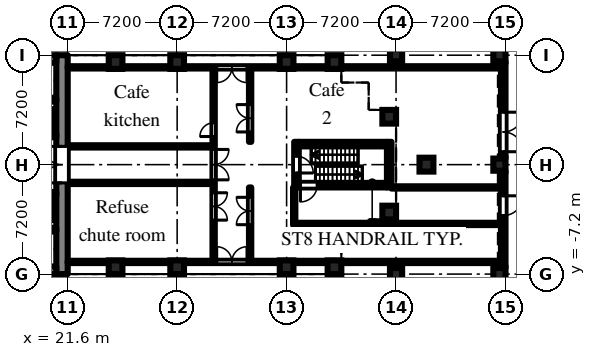
"""IFC4 building model, lengths in metres.
Left out: names, types, materials, properties, quantities, classifications, styles, units other than length and angle.
Written with IfcOpenShell. Run it as: python <this file> out.ifc"""

import sys

from ifc_helpers import new_model, si_unit, direction, frame, frame_2d, origin, origin_2d, place, context, subcontext, project, spatial, rectangle, hollow_circle, extrude, element, fill, save


model = new_model("IFC4")
c1 = context("Model", 3, precision=1e-05, world=origin(), true_north=direction((0.0, 1.0)))
c2 = subcontext(c1, "Body", "Model", "MODEL_VIEW")
j1 = project(units=[si_unit("LENGTHUNIT", "METRE"), si_unit("PLANEANGLEUNIT", "RADIAN")], contexts=[c1])
p1 = place(None, origin())
s1 = spatial("IfcSite", under=j1, at=p1, CompositionType="ELEMENT")
p2 = place(p1, origin())
s2 = spatial("IfcBuilding", under=s1, at=p2, CompositionType="ELEMENT")
p3 = place(p2, origin())
s3 = spatial("IfcBuildingStorey", under=s2, at=p3, CompositionType="ELEMENT", Elevation=0.0)
for number, where, z_axis, x_axis in (
    (1, (24.75, -6.75, 0.0), (0.0, 0.0, 1.0), (1.0, 0.0, 0.0)),
    (2, (24.75, 6.75, 0.0), (0.0, 0.0, 1.0), (1.0, 0.0, 0.0)),
    (3, (28.8, -6.75, 0.0), (0.0, 0.0, 1.0), (1.0, 0.0, 0.0)),
    (4, (28.8, 6.75, 0.0), (0.0, 0.0, 1.0), (1.0, 0.0, 0.0)),
    (5, (36.0, -6.75, 0.0), (0.0, 0.0, 1.0), (1.0, 0.0, 0.0)),
    (6, (36.0, 6.75, 0.0), (0.0, 0.0, 1.0), (1.0, 0.0, 0.0)),
    (7, (39.15, -6.75, 0.0), (0.0, 0.0, 1.0), (1.0, 0.0, 0.0)),
    (8, (39.15, 6.75, 0.0), (0.0, 0.0, 1.0), (1.0, 0.0, 0.0)),
    (9, (42.75, -3.15, 0.0), (0.0, 0.0, 1.0), (1.0, 0.0, 0.0)),
    (10, (42.75, 3.15, 0.0), (0.0, 0.0, 1.0), (1.0, 0.0, 0.0)),
):
    element("IfcColumn", number, at=place(p3, frame(where, z_axis=z_axis, x_axis=x_axis)), inside=s3, PredefinedType="COLUMN", context=c2, shape_type="SweptSolid", body=[
        extrude(rectangle(XDim=0.9, YDim=0.9, at=origin_2d()), origin(), (0.0, 0.0, 1.0), 7.2),
    ])
for number, where, z_axis, x_axis in (
    (11, (43.2, -7.2, 0.0), (0.0, 0.0, 1.0), (1.0, 0.0, 0.0)),
    (12, (43.2, 7.2, 0.0), (0.0, 0.0, 1.0), (1.0, 0.0, 0.0)),
    (13, (50.0, -7.2, 0.0), (0.0, 0.0, 1.0), (1.0, 0.0, 0.0)),
    (14, (50.0, 0.0, 0.0), (0.0, 0.0, 1.0), (1.0, 0.0, 0.0)),
    (15, (50.0, 7.2, 0.0), (0.0, 0.0, 1.0), (1.0, 0.0, 0.0)),
):
    element("IfcColumn", number, at=place(p3, frame(where, z_axis=z_axis, x_axis=x_axis)), inside=s3, PredefinedType="COLUMN", context=c2, shape_type="SweptSolid", body=[
        extrude(rectangle(XDim=0.8, YDim=0.8, at=origin_2d()), origin(), (0.0, 0.0, 1.0), 6.6),
    ])
p4 = place(p3, frame((45.2, 0.0, 0.0), z_axis=(0.0, 0.0, 1.0), x_axis=(1.0, 0.0, 0.0)))
e16 = element("IfcColumn", 16, at=p4, inside=s3, PredefinedType="COLUMN", context=c2, shape_type="SweptSolid", body=[
    extrude(hollow_circle(Radius=0.457, WallThickness=0.05, at=origin_2d()), origin(), (0.0, 0.0, 1.0), 7.5),
])
p5 = place(p3, frame((50.25, -6.8, 0.0), z_axis=(0.0, 0.0, 1.0), x_axis=(0.0, 1.0, 0.0)))
e17 = element("IfcWall", 17, at=p5, inside=s3, PredefinedType="SOLIDWALL", context=c2, shape_type="SweptSolid", body=[
    extrude(rectangle(XDim=6.4, YDim=0.3, at=frame_2d((3.2, 0.0))), origin(), (0.0, 0.0, 1.0), 6.6),
])
p6 = place(p5, frame((3.45, 0.0, 0.0)))
e18 = element("IfcOpeningElement", 18, at=p6, cuts=e17, PredefinedType="OPENING", context=c2, shape_type="SweptSolid", body=[
    extrude(rectangle(XDim=1.3, YDim=2.1, at=frame_2d((0.65, 1.05))), frame((0.0, 0.16, 0.0), z_axis=(0.0, -1.0, 0.0), x_axis=(1.0, 0.0, 0.0)), (0.0, 0.0, 1.0), 0.32),
])
p7 = place(p3, frame((50.25, 0.4, 0.0), z_axis=(0.0, 0.0, 1.0), x_axis=(0.0, 1.0, 0.0)))
e19 = element("IfcWall", 19, at=p7, inside=s3, PredefinedType="SOLIDWALL", context=c2, shape_type="SweptSolid", body=[
    extrude(rectangle(XDim=6.4, YDim=0.3, at=frame_2d((3.2, 0.0))), origin(), (0.0, 0.0, 1.0), 6.6),
])
p8 = place(p7, frame((0.45, 0.0, 0.0)))
e20 = element("IfcOpeningElement", 20, at=p8, cuts=e19, PredefinedType="OPENING", context=c2, shape_type="SweptSolid", body=[
    extrude(rectangle(XDim=2.6, YDim=2.4, at=frame_2d((1.3, 1.2))), frame((0.0, 0.16, 0.0), z_axis=(0.0, -1.0, 0.0), x_axis=(1.0, 0.0, 0.0)), (0.0, 0.0, 1.0), 0.32),
])
p9 = place(p3, frame((21.225, -7.2, 0.0), z_axis=(0.0, 0.0, 1.0), x_axis=(0.0, 1.0, 0.0)))
e21 = element("IfcWall", 21, at=p9, inside=s3, PredefinedType="SHEAR", context=c2, shape_type="SweptSolid", body=[
    extrude(rectangle(XDim=14.4, YDim=0.75, at=frame_2d((7.2, 0.0))), origin(), (0.0, 0.0, 1.0), 6.6),
])
p10 = place(p9, frame((6.0, 0.0, 0.0)))
e22 = element("IfcOpeningElement", 22, at=p10, cuts=e21, PredefinedType="OPENING", context=c2, shape_type="SweptSolid", body=[
    extrude(rectangle(XDim=2.4, YDim=2.2, at=frame_2d((1.2, 1.1))), frame((0.0, 0.385, 0.0), z_axis=(0.0, -1.0, 0.0), x_axis=(1.0, 0.0, 0.0)), (0.0, 0.0, 1.0), 0.77),
])
p11 = place(p3, frame((7.9, 6.95, 0.0), z_axis=(0.0, 0.0, 1.0), x_axis=(1.0, 0.0, 0.0)))
e23 = element("IfcWall", 23, at=p11, inside=s3, PredefinedType="SHEAR", context=c2, shape_type="SweptSolid", body=[
    extrude(rectangle(XDim=12.95, YDim=0.5, at=frame_2d((6.475, 0.0))), origin(), (0.0, 0.0, 1.0), 6.6),
])
p12 = place(p11, frame((5.35, 0.0, 0.0)))
e24 = element("IfcOpeningElement", 24, at=p12, cuts=e23, PredefinedType="OPENING", context=c2, shape_type="SweptSolid", body=[
    extrude(rectangle(XDim=1.1, YDim=2.1, at=frame_2d((0.55, 1.05))), frame((0.0, 0.26, 0.0), z_axis=(0.0, -1.0, 0.0), x_axis=(1.0, 0.0, 0.0)), (0.0, 0.0, 1.0), 0.52),
])
p13 = place(p3, frame((7.9, 1.925, 0.0), z_axis=(0.0, 0.0, 1.0), x_axis=(1.0, 0.0, 0.0)))
e25 = element("IfcWall", 25, at=p13, inside=s3, PredefinedType="SHEAR", context=c2, shape_type="SweptSolid", body=[
    extrude(rectangle(XDim=12.95, YDim=0.25, at=frame_2d((6.475, 0.0))), origin(), (0.0, 0.0, 1.0), 6.6),
])
p14 = place(p13, frame((11.425, 0.0, 0.0)))
e26 = element("IfcOpeningElement", 26, at=p14, cuts=e25, PredefinedType="OPENING", context=c2, shape_type="SweptSolid", body=[
    extrude(rectangle(XDim=1.1, YDim=2.1, at=frame_2d((0.55, 1.05))), frame((0.0, 0.135, 0.0), z_axis=(0.0, -1.0, 0.0), x_axis=(1.0, 0.0, 0.0)), (0.0, 0.0, 1.0), 0.27),
])
p15 = place(p13, frame((0.525, 0.0, 0.0)))
e27 = element("IfcOpeningElement", 27, at=p15, cuts=e25, PredefinedType="OPENING", context=c2, shape_type="SweptSolid", body=[
    extrude(rectangle(XDim=0.9, YDim=2.1, at=frame_2d((0.45, 1.05))), frame((0.0, 0.135, 0.0), z_axis=(0.0, -1.0, 0.0), x_axis=(1.0, 0.0, 0.0)), (0.0, 0.0, 1.0), 0.27),
])
p16 = place(p13, frame((2.625, 0.0, 0.0)))
e28 = element("IfcOpeningElement", 28, at=p16, cuts=e25, PredefinedType="OPENING", context=c2, shape_type="SweptSolid", body=[
    extrude(rectangle(XDim=1.1, YDim=2.1, at=frame_2d((0.55, 1.05))), frame((0.0, 0.135, 0.0), z_axis=(0.0, -1.0, 0.0), x_axis=(1.0, 0.0, 0.0)), (0.0, 0.0, 1.0), 0.27),
])
p17 = place(p13, frame((7.125, 0.0, 0.0)))
e29 = element("IfcOpeningElement", 29, at=p17, cuts=e25, PredefinedType="OPENING", context=c2, shape_type="SweptSolid", body=[
    extrude(rectangle(XDim=0.9, YDim=2.1, at=frame_2d((0.45, 1.05))), frame((0.0, 0.135, 0.0), z_axis=(0.0, -1.0, 0.0), x_axis=(1.0, 0.0, 0.0)), (0.0, 0.0, 1.0), 0.27),
])
p18 = place(p3, frame((12.3, 4.275, 0.0), z_axis=(0.0, 0.0, 1.0), x_axis=(1.0, 0.0, 0.0)))
e30 = element("IfcWall", 30, at=p18, inside=s3, PredefinedType="SHEAR", context=c2, shape_type="SweptSolid", body=[
    extrude(rectangle(XDim=8.55, YDim=0.25, at=frame_2d((4.275, 0.0))), origin(), (0.0, 0.0, 1.0), 6.6),
])
p19 = place(p3, frame((7.9, -6.95, 0.0), z_axis=(0.0, 0.0, 1.0), x_axis=(1.0, 0.0, 0.0)))
e31 = element("IfcWall", 31, at=p19, inside=s3, PredefinedType="SHEAR", context=c2, shape_type="SweptSolid", body=[
    extrude(rectangle(XDim=12.95, YDim=0.5, at=frame_2d((6.475, 0.0))), origin(), (0.0, 0.0, 1.0), 6.6),
])
p20 = place(p19, frame((5.35, 0.0, 0.0)))
e32 = element("IfcOpeningElement", 32, at=p20, cuts=e31, PredefinedType="OPENING", context=c2, shape_type="SweptSolid", body=[
    extrude(rectangle(XDim=1.1, YDim=2.1, at=frame_2d((0.55, 1.05))), frame((0.0, 0.26, 0.0), z_axis=(0.0, -1.0, 0.0), x_axis=(1.0, 0.0, 0.0)), (0.0, 0.0, 1.0), 0.52),
])
p21 = place(p3, frame((7.9, -1.925, 0.0), z_axis=(0.0, 0.0, 1.0), x_axis=(1.0, 0.0, 0.0)))
e33 = element("IfcWall", 33, at=p21, inside=s3, PredefinedType="SHEAR", context=c2, shape_type="SweptSolid", body=[
    extrude(rectangle(XDim=12.95, YDim=0.25, at=frame_2d((6.475, 0.0))), origin(), (0.0, 0.0, 1.0), 6.6),
])
p22 = place(p21, frame((4.825, 0.0, 0.0)))
e34 = element("IfcOpeningElement", 34, at=p22, cuts=e33, PredefinedType="OPENING", context=c2, shape_type="SweptSolid", body=[
    extrude(rectangle(XDim=1.1, YDim=2.1, at=frame_2d((0.55, 1.05))), frame((0.0, 0.135, 0.0), z_axis=(0.0, -1.0, 0.0), x_axis=(1.0, 0.0, 0.0)), (0.0, 0.0, 1.0), 0.27),
])
p23 = place(p21, frame((7.025, 0.0, 0.0)))
e35 = element("IfcOpeningElement", 35, at=p23, cuts=e33, PredefinedType="OPENING", context=c2, shape_type="SweptSolid", body=[
    extrude(rectangle(XDim=1.1, YDim=2.1, at=frame_2d((0.55, 1.05))), frame((0.0, 0.135, 0.0), z_axis=(0.0, -1.0, 0.0), x_axis=(1.0, 0.0, 0.0)), (0.0, 0.0, 1.0), 0.27),
])
p24 = place(p21, frame((9.225, 0.0, 0.0)))
e36 = element("IfcOpeningElement", 36, at=p24, cuts=e33, PredefinedType="OPENING", context=c2, shape_type="SweptSolid", body=[
    extrude(rectangle(XDim=1.1, YDim=2.1, at=frame_2d((0.55, 1.05))), frame((0.0, 0.135, 0.0), z_axis=(0.0, -1.0, 0.0), x_axis=(1.0, 0.0, 0.0)), (0.0, 0.0, 1.0), 0.27),
])
p25 = place(p21, frame((11.425, 0.0, 0.0)))
e37 = element("IfcOpeningElement", 37, at=p25, cuts=e33, PredefinedType="OPENING", context=c2, shape_type="SweptSolid", body=[
    extrude(rectangle(XDim=1.1, YDim=2.1, at=frame_2d((0.55, 1.05))), frame((0.0, 0.135, 0.0), z_axis=(0.0, -1.0, 0.0), x_axis=(1.0, 0.0, 0.0)), (0.0, 0.0, 1.0), 0.27),
])
p26 = place(p21, frame((0.525, 0.0, 0.0)))
e38 = element("IfcOpeningElement", 38, at=p26, cuts=e33, PredefinedType="OPENING", context=c2, shape_type="SweptSolid", body=[
    extrude(rectangle(XDim=0.9, YDim=2.1, at=frame_2d((0.45, 1.05))), frame((0.0, 0.135, 0.0), z_axis=(0.0, -1.0, 0.0), x_axis=(1.0, 0.0, 0.0)), (0.0, 0.0, 1.0), 0.27),
])
p27 = place(p21, frame((2.625, 0.0, 0.0)))
e39 = element("IfcOpeningElement", 39, at=p27, cuts=e33, PredefinedType="OPENING", context=c2, shape_type="SweptSolid", body=[
    extrude(rectangle(XDim=1.1, YDim=2.1, at=frame_2d((0.55, 1.05))), frame((0.0, 0.135, 0.0), z_axis=(0.0, -1.0, 0.0), x_axis=(1.0, 0.0, 0.0)), (0.0, 0.0, 1.0), 0.27),
])
p28 = place(p3, frame((12.3, -4.275, 0.0), z_axis=(0.0, 0.0, 1.0), x_axis=(1.0, 0.0, 0.0)))
e40 = element("IfcWall", 40, at=p28, inside=s3, PredefinedType="SHEAR", context=c2, shape_type="SweptSolid", body=[
    extrude(rectangle(XDim=8.55, YDim=0.25, at=frame_2d((4.275, 0.0))), origin(), (0.0, 0.0, 1.0), 6.6),
])
p29 = place(p3, frame((36.65, -1.5, 0.0), z_axis=(0.0, 0.0, 1.0), x_axis=(0.0, 1.0, 0.0)))
e41 = element("IfcWall", 41, at=p29, inside=s3, PredefinedType="SHEAR", context=c2, shape_type="SweptSolid", body=[
    extrude(rectangle(XDim=3.0, YDim=0.3, at=frame_2d((1.5, 0.0))), origin(), (0.0, 0.0, 1.0), 6.6),
])
p30 = place(p29, frame((0.95, 0.0, 0.0)))
e42 = element("IfcOpeningElement", 42, at=p30, cuts=e41, PredefinedType="OPENING", context=c2, shape_type="SweptSolid", body=[
    extrude(rectangle(XDim=1.1, YDim=2.1, at=frame_2d((0.55, 1.05))), frame((0.0, 0.16, 0.0), z_axis=(0.0, -1.0, 0.0), x_axis=(1.0, 0.0, 0.0)), (0.0, 0.0, 1.0), 0.32),
])
p31 = place(p3, frame((42.75, -1.5, 0.0), z_axis=(0.0, 0.0, 1.0), x_axis=(0.0, 1.0, 0.0)))
e43 = element("IfcWall", 43, at=p31, inside=s3, PredefinedType="SHEAR", context=c2, shape_type="SweptSolid", body=[
    extrude(rectangle(XDim=3.0, YDim=0.3, at=frame_2d((1.5, 0.0))), origin(), (0.0, 0.0, 1.0), 6.6),
])
p32 = place(p3, frame((36.8, -1.35, 0.0), z_axis=(0.0, 0.0, 1.0), x_axis=(1.0, 0.0, 0.0)))
e44 = element("IfcWall", 44, at=p32, inside=s3, PredefinedType="SHEAR", context=c2, shape_type="SweptSolid", body=[
    extrude(rectangle(XDim=5.8, YDim=0.3, at=frame_2d((2.9, 0.0))), origin(), (0.0, 0.0, 1.0), 6.6),
])
p33 = place(p32, frame((0.11, 0.0, 0.0)))
e45 = element("IfcOpeningElement", 45, at=p33, cuts=e44, PredefinedType="OPENING", context=c2, shape_type="SweptSolid", body=[
    extrude(rectangle(XDim=1.1, YDim=2.1, at=frame_2d((0.55, 1.05))), frame((0.0, 0.16, 0.0), z_axis=(0.0, -1.0, 0.0), x_axis=(1.0, 0.0, 0.0)), (0.0, 0.0, 1.0), 0.32),
])
p34 = place(p3, frame((36.8, 1.35, 0.0), z_axis=(0.0, 0.0, 1.0), x_axis=(1.0, 0.0, 0.0)))
e46 = element("IfcWall", 46, at=p34, inside=s3, PredefinedType="SHEAR", context=c2, shape_type="SweptSolid", body=[
    extrude(rectangle(XDim=5.8, YDim=0.3, at=frame_2d((2.9, 0.0))), origin(), (0.0, 0.0, 1.0), 6.6),
])
p35 = place(p3, frame((21.6, -6.4, 0.0), z_axis=(0.0, 0.0, 1.0), x_axis=(1.0, 0.0, 0.0)))
e47 = element("IfcWall", 47, at=p35, inside=s3, PredefinedType="PARTITIONING", context=c2, shape_type="SweptSolid", body=[
    extrude(rectangle(XDim=28.62, YDim=0.15, at=frame_2d((14.31, 0.0))), origin(), (0.0, 0.0, 1.0), 6.6),
])
p36 = place(p35, frame((9.8, 0.0, 0.0)))
e48 = element("IfcOpeningElement", 48, at=p36, cuts=e47, PredefinedType="OPENING", context=c2, shape_type="SweptSolid", body=[
    extrude(rectangle(XDim=2.0, YDim=2.1, at=frame_2d((1.0, 1.05))), frame((0.0, 0.085, 0.0), z_axis=(0.0, -1.0, 0.0), x_axis=(1.0, 0.0, 0.0)), (0.0, 0.0, 1.0), 0.17),
])
for number, where, z_axis, x_axis in (
    (49, (21.6, -1.2, 0.0), (0.0, 0.0, 1.0), (1.0, 0.0, 0.0)),
    (50, (21.6, 1.2, 0.0), (0.0, 0.0, 1.0), (1.0, 0.0, 0.0)),
):
    element("IfcWall", number, at=place(p3, frame(where, z_axis=z_axis, x_axis=x_axis)), inside=s3, PredefinedType="PARTITIONING", context=c2, shape_type="SweptSolid", body=[
        extrude(rectangle(XDim=9.525, YDim=0.15, at=frame_2d((4.762, 0.0))), origin(), (0.0, 0.0, 1.0), 6.6),
    ])
p37 = place(p3, frame((21.6, 6.4, 0.0), z_axis=(0.0, 0.0, 1.0), x_axis=(1.0, 0.0, 0.0)))
e51 = element("IfcWall", 51, at=p37, inside=s3, PredefinedType="PARTITIONING", context=c2, shape_type="SweptSolid", body=[
    extrude(rectangle(XDim=28.62, YDim=0.15, at=frame_2d((14.31, 0.0))), origin(), (0.0, 0.0, 1.0), 6.6),
])
p38 = place(p37, frame((9.8, 0.0, 0.0)))
e52 = element("IfcOpeningElement", 52, at=p38, cuts=e51, PredefinedType="OPENING", context=c2, shape_type="SweptSolid", body=[
    extrude(rectangle(XDim=2.0, YDim=2.1, at=frame_2d((1.0, 1.05))), frame((0.0, 0.085, 0.0), z_axis=(0.0, -1.0, 0.0), x_axis=(1.0, 0.0, 0.0)), (0.0, 0.0, 1.0), 0.17),
])
p39 = place(p3, frame((31.2, -6.325, 0.0), z_axis=(0.0, 0.0, 1.0), x_axis=(0.0, 1.0, 0.0)))
e53 = element("IfcWall", 53, at=p39, inside=s3, PredefinedType="PARTITIONING", context=c2, shape_type="SweptSolid", body=[
    extrude(rectangle(XDim=12.65, YDim=0.15, at=frame_2d((6.325, 0.0))), origin(), (0.0, 0.0, 1.0), 6.6),
])
p40 = place(p39, frame((5.325, 0.0, 0.0)))
e54 = element("IfcOpeningElement", 54, at=p40, cuts=e53, PredefinedType="OPENING", context=c2, shape_type="SweptSolid", body=[
    extrude(rectangle(XDim=2.0, YDim=2.1, at=frame_2d((1.0, 1.05))), frame((0.0, 0.085, 0.0), z_axis=(0.0, -1.0, 0.0), x_axis=(1.0, 0.0, 0.0)), (0.0, 0.0, 1.0), 0.17),
])
p41 = place(p39, frame((8.175, 0.0, 0.0)))
e55 = element("IfcOpeningElement", 55, at=p41, cuts=e53, PredefinedType="OPENING", context=c2, shape_type="SweptSolid", body=[
    extrude(rectangle(XDim=0.9, YDim=2.1, at=frame_2d((0.45, 1.05))), frame((0.0, 0.085, 0.0), z_axis=(0.0, -1.0, 0.0), x_axis=(1.0, 0.0, 0.0)), (0.0, 0.0, 1.0), 0.17),
])
p42 = place(p39, frame((2.675, 0.0, 0.0)))
e56 = element("IfcOpeningElement", 56, at=p42, cuts=e53, PredefinedType="OPENING", context=c2, shape_type="SweptSolid", body=[
    extrude(rectangle(XDim=1.8, YDim=2.1, at=frame_2d((0.9, 1.05))), frame((0.0, 0.085, 0.0), z_axis=(0.0, -1.0, 0.0), x_axis=(1.0, 0.0, 0.0)), (0.0, 0.0, 1.0), 0.17),
])
p43 = place(p3, frame((33.6, -6.325, 0.0), z_axis=(0.0, 0.0, 1.0), x_axis=(0.0, 1.0, 0.0)))
e57 = element("IfcWall", 57, at=p43, inside=s3, PredefinedType="PARTITIONING", context=c2, shape_type="SweptSolid", body=[
    extrude(rectangle(XDim=4.825, YDim=0.15, at=frame_2d((2.413, 0.0))), origin(), (0.0, 0.0, 1.0), 6.6),
])
p44 = place(p43, frame((2.375, 0.0, 0.0)))
e58 = element("IfcOpeningElement", 58, at=p44, cuts=e57, PredefinedType="OPENING", context=c2, shape_type="SweptSolid", body=[
    extrude(rectangle(XDim=1.8, YDim=2.1, at=frame_2d((0.9, 1.05))), frame((0.0, 0.085, 0.0), z_axis=(0.0, -1.0, 0.0), x_axis=(1.0, 0.0, 0.0)), (0.0, 0.0, 1.0), 0.17),
])
p45 = place(p3, frame((33.6, 1.5, 0.0), z_axis=(0.0, 0.0, 1.0), x_axis=(0.0, 1.0, 0.0)))
e59 = element("IfcWall", 59, at=p45, inside=s3, PredefinedType="PARTITIONING", context=c2, shape_type="SweptSolid", body=[
    extrude(rectangle(XDim=4.825, YDim=0.15, at=frame_2d((2.413, 0.0))), origin(), (0.0, 0.0, 1.0), 6.6),
])
p46 = place(p45, frame((0.65, 0.0, 0.0)))
e60 = element("IfcOpeningElement", 60, at=p46, cuts=e59, PredefinedType="OPENING", context=c2, shape_type="SweptSolid", body=[
    extrude(rectangle(XDim=1.8, YDim=2.1, at=frame_2d((0.9, 1.05))), frame((0.0, 0.085, 0.0), z_axis=(0.0, -1.0, 0.0), x_axis=(1.0, 0.0, 0.0)), (0.0, 0.0, 1.0), 0.17),
])
p47 = place(p3, frame((36.5, -3.975, 0.0), z_axis=(0.0, 0.0, 1.0), x_axis=(0.0, 1.0, 0.0)))
e61 = element("IfcWall", 61, at=p47, inside=s3, PredefinedType="PARTITIONING", context=c2, shape_type="SweptSolid", body=[
    extrude(rectangle(XDim=2.475, YDim=0.15, at=frame_2d((1.238, 0.0))), origin(), (0.0, 0.0, 1.0), 6.6),
])
p48 = place(p3, frame((36.575, -3.9, 0.0), z_axis=(0.0, 0.0, 1.0), x_axis=(1.0, 0.0, 0.0)))
e62 = element("IfcWall", 62, at=p48, inside=s3, PredefinedType="PARTITIONING", context=c2, shape_type="SweptSolid", body=[
    extrude(rectangle(XDim=13.645, YDim=0.15, at=frame_2d((6.823, 0.0))), origin(), (0.0, 0.0, 1.0), 6.6),
])
p49 = place(p3, frame((42.9, -1.5, 0.0), z_axis=(0.0, 0.0, 1.0), x_axis=(1.0, 0.0, 0.0)))
e63 = element("IfcWall", 63, at=p49, inside=s3, PredefinedType="PARTITIONING", context=c2, shape_type="SweptSolid", body=[
    extrude(rectangle(XDim=7.32, YDim=0.15, at=frame_2d((3.66, 0.0))), origin(), (0.0, 0.0, 1.0), 6.6),
])
p50 = place(p6, frame((1.3, 0.0, 0.0), z_axis=(0.0, 0.0, 1.0), x_axis=(-1.0, 0.0, 0.0)))
e64 = element("IfcDoor", 64, at=p50, inside=s3, OperationType="SINGLE_SWING_LEFT", PredefinedType="DOOR", context=c2, shape_type="SweptSolid", body=[
    extrude(rectangle(XDim=1.3, YDim=2.1, at=frame_2d((0.65, 1.05))), frame((0.0, 0.025, 0.0), z_axis=(0.0, -1.0, 0.0), x_axis=(1.0, 0.0, 0.0)), (0.0, 0.0, 1.0), 0.05),
])
fill(e18, e64)
p51 = place(p8, frame((2.6, 0.0, 0.0), z_axis=(0.0, 0.0, 1.0), x_axis=(-1.0, 0.0, 0.0)))
e65 = element("IfcDoor", 65, at=p51, inside=s3, OperationType="DOUBLE_DOOR_DOUBLE_SWING", PredefinedType="DOOR", context=c2, shape_type="SweptSolid", body=[
    extrude(rectangle(XDim=2.6, YDim=2.4, at=frame_2d((1.3, 1.2))), frame((0.0, 0.025, 0.0), z_axis=(0.0, -1.0, 0.0), x_axis=(1.0, 0.0, 0.0)), (0.0, 0.0, 1.0), 0.05),
])
fill(e20, e65)
p52 = place(p10, origin())
e66 = element("IfcDoor", 66, at=p52, inside=s3, OperationType="DOUBLE_DOOR_DOUBLE_SWING", PredefinedType="DOOR", context=c2, shape_type="SweptSolid", body=[
    extrude(rectangle(XDim=2.4, YDim=2.2, at=frame_2d((1.2, 1.1))), frame((0.0, 0.025, 0.0), z_axis=(0.0, -1.0, 0.0), x_axis=(1.0, 0.0, 0.0)), (0.0, 0.0, 1.0), 0.05),
])
fill(e22, e66)
p53 = place(p30, frame((1.1, 0.0, 0.0), z_axis=(0.0, 0.0, 1.0), x_axis=(-1.0, 0.0, 0.0)))
e67 = element("IfcDoor", 67, at=p53, inside=s3, OperationType="SINGLE_SWING_RIGHT", PredefinedType="DOOR", context=c2, shape_type="SweptSolid", body=[
    extrude(rectangle(XDim=1.1, YDim=2.1, at=frame_2d((0.55, 1.05))), frame((0.0, 0.025, 0.0), z_axis=(0.0, -1.0, 0.0), x_axis=(1.0, 0.0, 0.0)), (0.0, 0.0, 1.0), 0.05),
])
fill(e42, e67)
p54 = place(p33, frame((1.1, 0.0, 0.0), z_axis=(0.0, 0.0, 1.0), x_axis=(-1.0, 0.0, 0.0)))
e68 = element("IfcDoor", 68, at=p54, inside=s3, OperationType="SINGLE_SWING_RIGHT", PredefinedType="DOOR", context=c2, shape_type="SweptSolid", body=[
    extrude(rectangle(XDim=1.1, YDim=2.1, at=frame_2d((0.55, 1.05))), frame((0.0, 0.025, 0.0), z_axis=(0.0, -1.0, 0.0), x_axis=(1.0, 0.0, 0.0)), (0.0, 0.0, 1.0), 0.05),
])
fill(e45, e68)
p55 = place(p46, origin())
e69 = element("IfcDoor", 69, at=p55, inside=s3, OperationType="DOUBLE_DOOR_DOUBLE_SWING", PredefinedType="DOOR", context=c2, shape_type="SweptSolid", body=[
    extrude(rectangle(XDim=1.8, YDim=2.1, at=frame_2d((0.9, 1.05))), frame((0.0, 0.025, 0.0), z_axis=(0.0, -1.0, 0.0), x_axis=(1.0, 0.0, 0.0)), (0.0, 0.0, 1.0), 0.05),
])
fill(e60, e69)
p56 = place(p38, frame((2.0, 0.0, 0.0), z_axis=(0.0, 0.0, 1.0), x_axis=(-1.0, 0.0, 0.0)))
e70 = element("IfcDoor", 70, at=p56, inside=s3, OperationType="DOUBLE_DOOR_DOUBLE_SWING", PredefinedType="DOOR", context=c2, shape_type="SweptSolid", body=[
    extrude(rectangle(XDim=2.0, YDim=2.1, at=frame_2d((1.0, 1.05))), frame((0.0, 0.025, 0.0), z_axis=(0.0, -1.0, 0.0), x_axis=(1.0, 0.0, 0.0)), (0.0, 0.0, 1.0), 0.05),
])
fill(e52, e70)
p57 = place(p44, origin())
e71 = element("IfcDoor", 71, at=p57, inside=s3, OperationType="DOUBLE_DOOR_DOUBLE_SWING", PredefinedType="DOOR", context=c2, shape_type="SweptSolid", body=[
    extrude(rectangle(XDim=1.8, YDim=2.1, at=frame_2d((0.9, 1.05))), frame((0.0, 0.025, 0.0), z_axis=(0.0, -1.0, 0.0), x_axis=(1.0, 0.0, 0.0)), (0.0, 0.0, 1.0), 0.05),
])
fill(e58, e71)
p58 = place(p36, origin())
e72 = element("IfcDoor", 72, at=p58, inside=s3, OperationType="DOUBLE_DOOR_DOUBLE_SWING", PredefinedType="DOOR", context=c2, shape_type="SweptSolid", body=[
    extrude(rectangle(XDim=2.0, YDim=2.1, at=frame_2d((1.0, 1.05))), frame((0.0, 0.025, 0.0), z_axis=(0.0, -1.0, 0.0), x_axis=(1.0, 0.0, 0.0)), (0.0, 0.0, 1.0), 0.05),
])
fill(e48, e72)
p59 = place(p40, frame((2.0, 0.0, 0.0), z_axis=(0.0, 0.0, 1.0), x_axis=(-1.0, 0.0, 0.0)))
e73 = element("IfcDoor", 73, at=p59, inside=s3, OperationType="DOUBLE_DOOR_DOUBLE_SWING", PredefinedType="DOOR", context=c2, shape_type="SweptSolid", body=[
    extrude(rectangle(XDim=2.0, YDim=2.1, at=frame_2d((1.0, 1.05))), frame((0.0, 0.025, 0.0), z_axis=(0.0, -1.0, 0.0), x_axis=(1.0, 0.0, 0.0)), (0.0, 0.0, 1.0), 0.05),
])
fill(e54, e73)
p60 = place(p41, origin())
e74 = element("IfcDoor", 74, at=p60, inside=s3, OperationType="SINGLE_SWING_LEFT", PredefinedType="DOOR", context=c2, shape_type="SweptSolid", body=[
    extrude(rectangle(XDim=0.9, YDim=2.1, at=frame_2d((0.45, 1.05))), frame((0.0, 0.025, 0.0), z_axis=(0.0, -1.0, 0.0), x_axis=(1.0, 0.0, 0.0)), (0.0, 0.0, 1.0), 0.05),
])
fill(e55, e74)
p61 = place(p42, frame((1.8, 0.0, 0.0), z_axis=(0.0, 0.0, 1.0), x_axis=(-1.0, 0.0, 0.0)))
e75 = element("IfcDoor", 75, at=p61, inside=s3, OperationType="DOUBLE_DOOR_DOUBLE_SWING", PredefinedType="DOOR", context=c2, shape_type="SweptSolid", body=[
    extrude(rectangle(XDim=1.8, YDim=2.1, at=frame_2d((0.9, 1.05))), frame((0.0, 0.025, 0.0), z_axis=(0.0, -1.0, 0.0), x_axis=(1.0, 0.0, 0.0)), (0.0, 0.0, 1.0), 0.05),
])
fill(e56, e75)
save(model, sys.argv[1])
